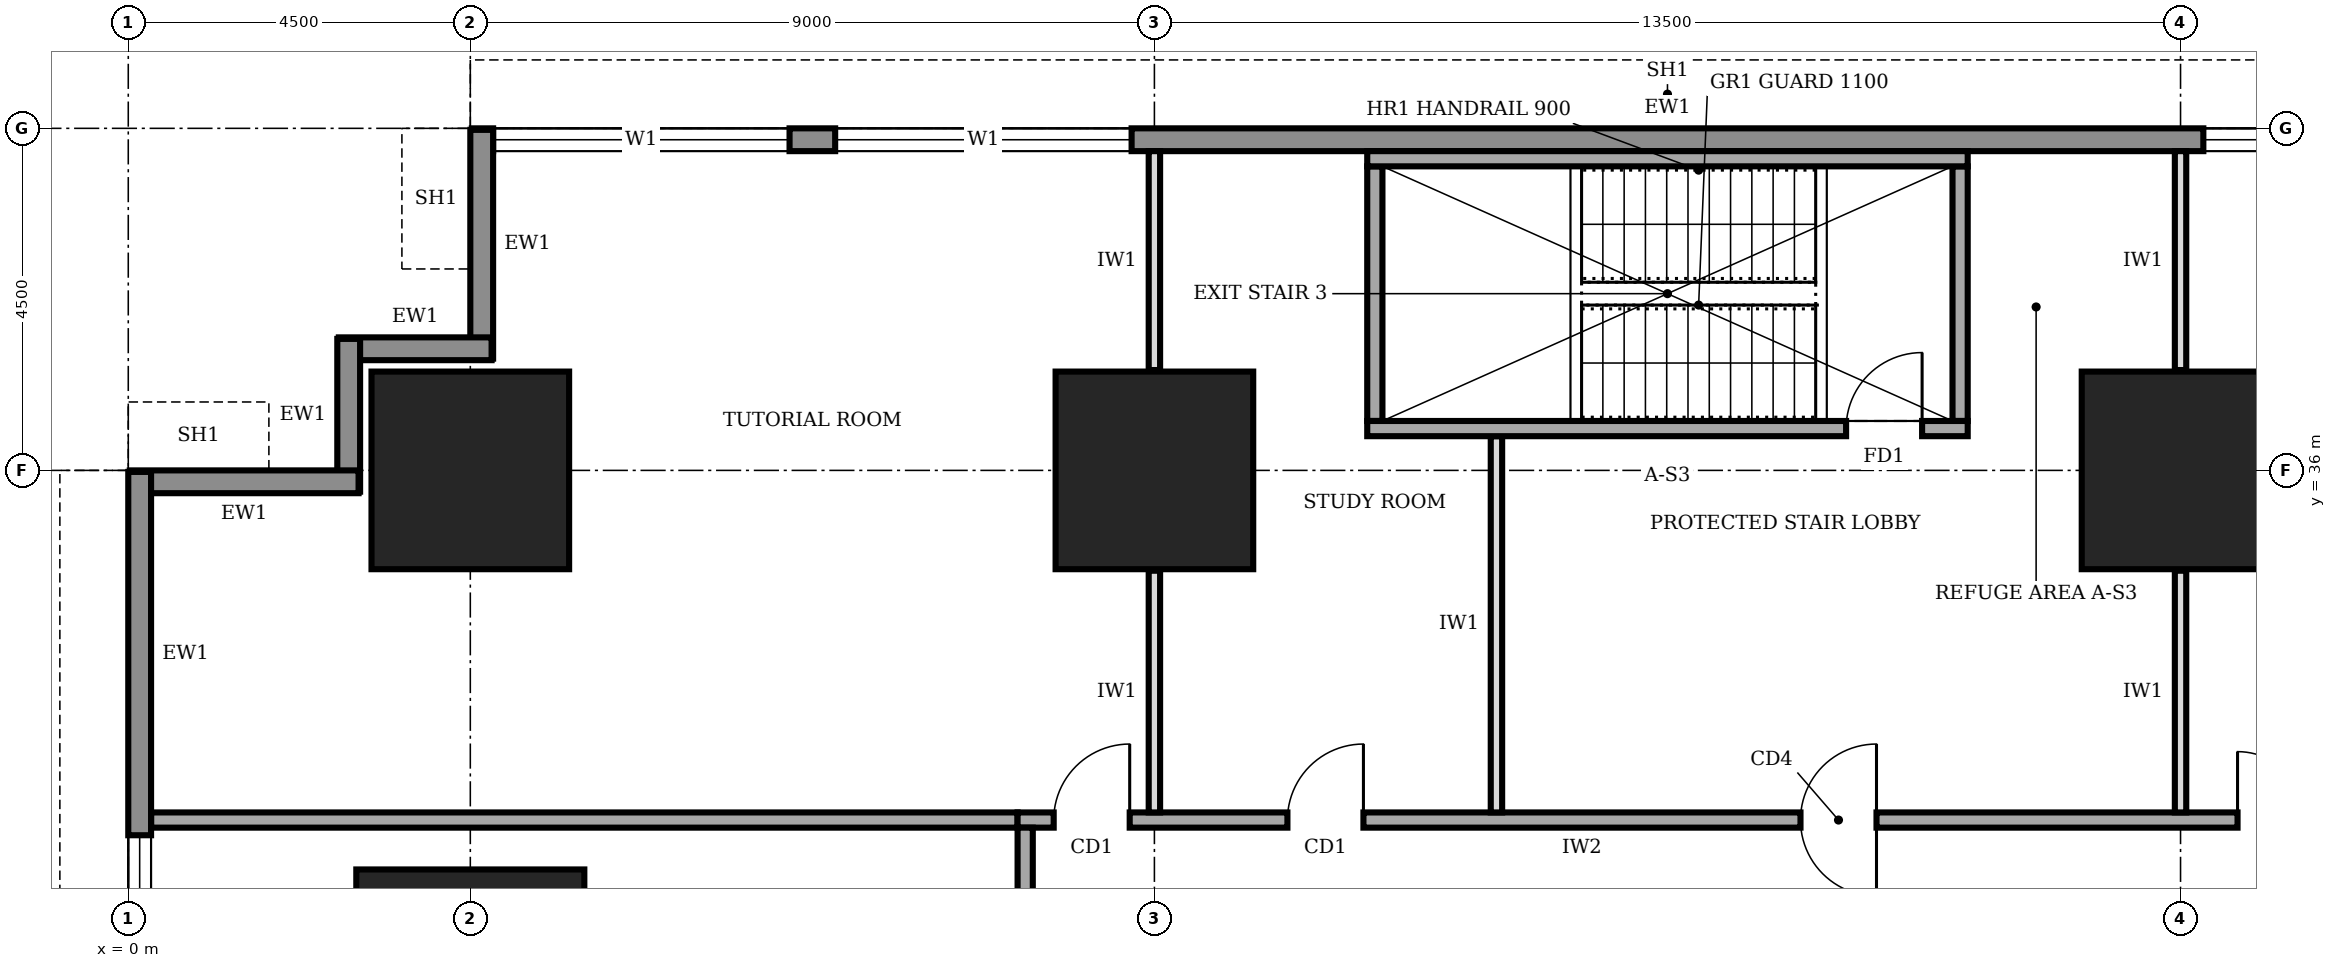
"""IFC4 building model, lengths in metres.
Left out: names, types, materials, properties, quantities, classifications, styles, units other than length and angle.
Written with IfcOpenShell. Run it as: python <this file> out.ifc"""

import sys

from ifc_helpers import new_model, si_unit, direction, frame, frame_2d, origin, origin_2d, place, context, subcontext, project, spatial, rectangle, extrude, element, fill, save


model = new_model("IFC4")
c1 = context("Model", 3, precision=1e-05, world=origin(), true_north=direction((0.0, 1.0)))
c2 = subcontext(c1, "Body", "Model", "MODEL_VIEW")
j1 = project(units=[si_unit("LENGTHUNIT", "METRE"), si_unit("PLANEANGLEUNIT", "RADIAN")], contexts=[c1])
p1 = place(None, origin())
s1 = spatial("IfcSite", under=j1, at=p1, CompositionType="ELEMENT")
p2 = place(p1, origin())
s2 = spatial("IfcBuilding", under=s1, at=p2, CompositionType="ELEMENT")
p3 = place(p2, frame((0.0, 0.0, 37.0)))
s3 = spatial("IfcBuildingStorey", under=s2, at=p3, CompositionType="ELEMENT", Elevation=37.0)
p4 = place(p3, frame((4.5, 29.25, 0.0), z_axis=(0.0, 0.0, 1.0), x_axis=(1.0, 0.0, 0.0)))
e1 = element("IfcColumn", 1, at=p4, inside=s3, PredefinedType="COLUMN", context=c2, shape_type="SweptSolid", body=[
    extrude(rectangle(XDim=3.0, YDim=3.0, at=origin_2d()), origin(), (0.0, 0.0, 1.0), 4.0),
])
for number, where, z_axis, x_axis in (
    (2, (4.5, 36.0, 0.0), (0.0, 0.0, 1.0), (1.0, 0.0, 0.0)),
    (3, (13.5, 36.0, 0.0), (0.0, 0.0, 1.0), (1.0, 0.0, 0.0)),
    (4, (27.0, 36.0, 0.0), (0.0, 0.0, 1.0), (1.0, 0.0, 0.0)),
):
    element("IfcColumn", number, at=place(p3, frame(where, z_axis=z_axis, x_axis=x_axis)), inside=s3, PredefinedType="COLUMN", context=c2, shape_type="SweptSolid", body=[
        extrude(rectangle(XDim=2.6, YDim=2.6, at=origin_2d()), origin(), (0.0, 0.0, 1.0), 4.0),
    ])
p5 = place(p3, frame((35.98, 40.35, 0.0), z_axis=(0.0, 0.0, 1.0), x_axis=(-1.0, 0.0, 0.0)))
e5 = element("IfcWall", 5, at=p5, inside=s3, PredefinedType="STANDARD", context=c2, shape_type="SweptSolid", body=[
    extrude(rectangle(XDim=31.46, YDim=0.3, at=frame_2d((15.73, 0.0))), origin(), (0.0, 0.0, 1.0), 3.75),
])
p6 = place(p5, frame((27.28, 0.0, 0.9)))
e6 = element("IfcOpeningElement", 6, at=p6, cuts=e5, PredefinedType="OPENING", context=c2, shape_type="SweptSolid", body=[
    extrude(rectangle(XDim=3.9, YDim=2.2, at=frame_2d((1.95, 1.1))), frame((0.0, 0.16, 0.0), z_axis=(0.0, -1.0, 0.0), x_axis=(1.0, 0.0, 0.0)), (0.0, 0.0, 1.0), 0.32),
])
p7 = place(p5, frame((22.78, 0.0, 0.9)))
e7 = element("IfcOpeningElement", 7, at=p7, cuts=e5, PredefinedType="OPENING", context=c2, shape_type="SweptSolid", body=[
    extrude(rectangle(XDim=3.9, YDim=2.2, at=frame_2d((1.95, 1.1))), frame((0.0, 0.16, 0.0), z_axis=(0.0, -1.0, 0.0), x_axis=(1.0, 0.0, 0.0)), (0.0, 0.0, 1.0), 0.32),
])
p8 = place(p5, frame((4.78, 0.0, 0.9)))
e8 = element("IfcOpeningElement", 8, at=p8, cuts=e5, PredefinedType="OPENING", context=c2, shape_type="SweptSolid", body=[
    extrude(rectangle(XDim=3.9, YDim=2.2, at=frame_2d((1.95, 1.1))), frame((0.0, 0.16, 0.0), z_axis=(0.0, -1.0, 0.0), x_axis=(1.0, 0.0, 0.0)), (0.0, 0.0, 1.0), 0.32),
])
p9 = place(p3, frame((4.65, 40.48, 0.0), z_axis=(0.0, 0.0, 1.0), x_axis=(0.0, -1.0, 0.0)))
e9 = element("IfcWall", 9, at=p9, inside=s3, PredefinedType="STANDARD", context=c2, shape_type="SweptSolid", body=[
    extrude(rectangle(XDim=3.01, YDim=0.3, at=frame_2d((1.505, 0.0))), origin(), (0.0, 0.0, 1.0), 2.85),
])
for number, where, z_axis, x_axis in (
    (10, (4.78, 37.6, 0.0), (0.0, 0.0, 1.0), (-1.0, 0.0, 0.0)),
    (11, (2.9, 37.73, 0.0), (0.0, 0.0, 1.0), (0.0, -1.0, 0.0)),
):
    element("IfcWall", number, at=place(p3, frame(where, z_axis=z_axis, x_axis=x_axis)), inside=s3, PredefinedType="STANDARD", context=c2, shape_type="SweptSolid", body=[
        extrude(rectangle(XDim=2.01, YDim=0.3, at=frame_2d((1.005, 0.0))), origin(), (0.0, 0.0, 1.0), 3.75),
    ])
p10 = place(p3, frame((3.03, 35.85, 0.0), z_axis=(0.0, 0.0, 1.0), x_axis=(-1.0, 0.0, 0.0)))
e12 = element("IfcWall", 12, at=p10, inside=s3, PredefinedType="STANDARD", context=c2, shape_type="SweptSolid", body=[
    extrude(rectangle(XDim=3.01, YDim=0.3, at=frame_2d((1.505, 0.0))), origin(), (0.0, 0.0, 1.0), 2.85),
])
p11 = place(p3, frame((0.15, 35.98, 0.0), z_axis=(0.0, 0.0, 1.0), x_axis=(0.0, -1.0, 0.0)))
e13 = element("IfcWall", 13, at=p11, inside=s3, PredefinedType="STANDARD", context=c2, shape_type="SweptSolid", body=[
    extrude(rectangle(XDim=31.46, YDim=0.3, at=frame_2d((15.73, 0.0))), origin(), (0.0, 0.0, 1.0), 3.75),
])
p12 = place(p11, frame((27.28, 0.0, 0.9)))
e14 = element("IfcOpeningElement", 14, at=p12, cuts=e13, PredefinedType="OPENING", context=c2, shape_type="SweptSolid", body=[
    extrude(rectangle(XDim=3.9, YDim=2.2, at=frame_2d((1.95, 1.1))), frame((0.0, 0.16, 0.0), z_axis=(0.0, -1.0, 0.0), x_axis=(1.0, 0.0, 0.0)), (0.0, 0.0, 1.0), 0.32),
])
p13 = place(p11, frame((22.78, 0.0, 0.9)))
e15 = element("IfcOpeningElement", 15, at=p13, cuts=e13, PredefinedType="OPENING", context=c2, shape_type="SweptSolid", body=[
    extrude(rectangle(XDim=3.9, YDim=2.2, at=frame_2d((1.95, 1.1))), frame((0.0, 0.16, 0.0), z_axis=(0.0, -1.0, 0.0), x_axis=(1.0, 0.0, 0.0)), (0.0, 0.0, 1.0), 0.32),
])
p14 = place(p11, frame((18.28, 0.0, 0.9)))
e16 = element("IfcOpeningElement", 16, at=p14, cuts=e13, PredefinedType="OPENING", context=c2, shape_type="SweptSolid", body=[
    extrude(rectangle(XDim=3.9, YDim=2.2, at=frame_2d((1.95, 1.1))), frame((0.0, 0.16, 0.0), z_axis=(0.0, -1.0, 0.0), x_axis=(1.0, 0.0, 0.0)), (0.0, 0.0, 1.0), 0.32),
])
p15 = place(p11, frame((13.78, 0.0, 0.9)))
e17 = element("IfcOpeningElement", 17, at=p15, cuts=e13, PredefinedType="OPENING", context=c2, shape_type="SweptSolid", body=[
    extrude(rectangle(XDim=3.9, YDim=2.2, at=frame_2d((1.95, 1.1))), frame((0.0, 0.16, 0.0), z_axis=(0.0, -1.0, 0.0), x_axis=(1.0, 0.0, 0.0)), (0.0, 0.0, 1.0), 0.32),
])
p16 = place(p11, frame((9.28, 0.0, 0.9)))
e18 = element("IfcOpeningElement", 18, at=p16, cuts=e13, PredefinedType="OPENING", context=c2, shape_type="SweptSolid", body=[
    extrude(rectangle(XDim=3.9, YDim=2.2, at=frame_2d((1.95, 1.1))), frame((0.0, 0.16, 0.0), z_axis=(0.0, -1.0, 0.0), x_axis=(1.0, 0.0, 0.0)), (0.0, 0.0, 1.0), 0.32),
])
p17 = place(p11, frame((4.78, 0.0, 0.9)))
e19 = element("IfcOpeningElement", 19, at=p17, cuts=e13, PredefinedType="OPENING", context=c2, shape_type="SweptSolid", body=[
    extrude(rectangle(XDim=3.9, YDim=2.2, at=frame_2d((1.95, 1.1))), frame((0.0, 0.16, 0.0), z_axis=(0.0, -1.0, 0.0), x_axis=(1.0, 0.0, 0.0)), (0.0, 0.0, 1.0), 0.32),
])
p18 = place(p3, frame((30.1, 31.4, 0.0), z_axis=(0.0, 0.0, 1.0), x_axis=(-1.0, 0.0, 0.0)))
e20 = element("IfcWall", 20, at=p18, inside=s3, PredefinedType="SOLIDWALL", context=c2, shape_type="SweptSolid", body=[
    extrude(rectangle(XDim=18.4, YDim=0.2, at=frame_2d((9.2, 0.0))), origin(), (0.0, 0.0, 1.0), 3.75),
])
p19 = place(p18, frame((16.925, 0.0, 0.0)))
e21 = element("IfcOpeningElement", 21, at=p19, cuts=e20, PredefinedType="OPENING", context=c2, shape_type="SweptSolid", body=[
    extrude(rectangle(XDim=1.0, YDim=2.1, at=frame_2d((0.5, 1.05))), frame((0.0, 0.11, 0.0), z_axis=(0.0, -1.0, 0.0), x_axis=(1.0, 0.0, 0.0)), (0.0, 0.0, 1.0), 0.22),
])
p20 = place(p18, frame((13.85, 0.0, 0.0)))
e22 = element("IfcOpeningElement", 22, at=p20, cuts=e20, PredefinedType="OPENING", context=c2, shape_type="SweptSolid", body=[
    extrude(rectangle(XDim=1.0, YDim=2.1, at=frame_2d((0.5, 1.05))), frame((0.0, 0.11, 0.0), z_axis=(0.0, -1.0, 0.0), x_axis=(1.0, 0.0, 0.0)), (0.0, 0.0, 1.0), 0.22),
])
p21 = place(p18, frame((7.1, 0.0, 0.0)))
e23 = element("IfcOpeningElement", 23, at=p21, cuts=e20, PredefinedType="OPENING", context=c2, shape_type="SweptSolid", body=[
    extrude(rectangle(XDim=1.0, YDim=2.1, at=frame_2d((0.5, 1.05))), frame((0.0, 0.11, 0.0), z_axis=(0.0, -1.0, 0.0), x_axis=(1.0, 0.0, 0.0)), (0.0, 0.0, 1.0), 0.22),
])
p22 = place(p18, frame((0.55, 0.0, 0.0)))
e24 = element("IfcOpeningElement", 24, at=p22, cuts=e20, PredefinedType="OPENING", context=c2, shape_type="SweptSolid", body=[
    extrude(rectangle(XDim=1.8, YDim=2.1, at=frame_2d((0.9, 1.05))), frame((0.0, 0.11, 0.0), z_axis=(0.0, -1.0, 0.0), x_axis=(1.0, 0.0, 0.0)), (0.0, 0.0, 1.0), 0.22),
])
p23 = place(p3, frame((11.8, 31.3, 0.0), z_axis=(0.0, 0.0, 1.0), x_axis=(0.0, -1.0, 0.0)))
e25 = element("IfcWall", 25, at=p23, inside=s3, PredefinedType="SOLIDWALL", context=c2, shape_type="SweptSolid", body=[
    extrude(rectangle(XDim=22.3, YDim=0.2, at=frame_2d((11.15, 0.0))), origin(), (0.0, 0.0, 1.0), 3.75),
])
p24 = place(p23, frame((19.55, 0.0, 0.0)))
e26 = element("IfcOpeningElement", 26, at=p24, cuts=e25, PredefinedType="OPENING", context=c2, shape_type="SweptSolid", body=[
    extrude(rectangle(XDim=1.0, YDim=2.1, at=frame_2d((0.5, 1.05))), frame((0.0, 0.11, 0.0), z_axis=(0.0, -1.0, 0.0), x_axis=(1.0, 0.0, 0.0)), (0.0, 0.0, 1.0), 0.22),
])
p25 = place(p23, frame((15.45, 0.0, 0.0)))
e27 = element("IfcOpeningElement", 27, at=p25, cuts=e25, PredefinedType="OPENING", context=c2, shape_type="SweptSolid", body=[
    extrude(rectangle(XDim=0.9, YDim=2.1, at=frame_2d((0.45, 1.05))), frame((0.0, 0.11, 0.0), z_axis=(0.0, -1.0, 0.0), x_axis=(1.0, 0.0, 0.0)), (0.0, 0.0, 1.0), 0.22),
])
p26 = place(p23, frame((12.45, 0.0, 0.0)))
e28 = element("IfcOpeningElement", 28, at=p26, cuts=e25, PredefinedType="OPENING", context=c2, shape_type="SweptSolid", body=[
    extrude(rectangle(XDim=0.9, YDim=2.1, at=frame_2d((0.45, 1.05))), frame((0.0, 0.11, 0.0), z_axis=(0.0, -1.0, 0.0), x_axis=(1.0, 0.0, 0.0)), (0.0, 0.0, 1.0), 0.22),
])
p27 = place(p23, frame((7.6, 0.0, 0.0)))
e29 = element("IfcOpeningElement", 29, at=p27, cuts=e25, PredefinedType="OPENING", context=c2, shape_type="SweptSolid", body=[
    extrude(rectangle(XDim=0.9, YDim=2.1, at=frame_2d((0.45, 1.05))), frame((0.0, 0.11, 0.0), z_axis=(0.0, -1.0, 0.0), x_axis=(1.0, 0.0, 0.0)), (0.0, 0.0, 1.0), 0.22),
])
p28 = place(p23, frame((4.8, 0.0, 0.0)))
e30 = element("IfcOpeningElement", 30, at=p28, cuts=e25, PredefinedType="OPENING", context=c2, shape_type="SweptSolid", body=[
    extrude(rectangle(XDim=1.0, YDim=2.1, at=frame_2d((0.5, 1.05))), frame((0.0, 0.11, 0.0), z_axis=(0.0, -1.0, 0.0), x_axis=(1.0, 0.0, 0.0)), (0.0, 0.0, 1.0), 0.22),
])
p29 = place(p23, frame((10.3, 0.0, 0.0)))
e31 = element("IfcOpeningElement", 31, at=p29, cuts=e25, PredefinedType="OPENING", context=c2, shape_type="SweptSolid", body=[
    extrude(rectangle(XDim=1.0, YDim=2.1, at=frame_2d((0.5, 1.05))), frame((0.0, 0.11, 0.0), z_axis=(0.0, -1.0, 0.0), x_axis=(1.0, 0.0, 0.0)), (0.0, 0.0, 1.0), 0.22),
])
p30 = place(p23, frame((1.55, 0.0, 0.0)))
e32 = element("IfcOpeningElement", 32, at=p30, cuts=e25, PredefinedType="OPENING", context=c2, shape_type="SweptSolid", body=[
    extrude(rectangle(XDim=1.0, YDim=2.1, at=frame_2d((0.5, 1.05))), frame((0.0, 0.11, 0.0), z_axis=(0.0, -1.0, 0.0), x_axis=(1.0, 0.0, 0.0)), (0.0, 0.0, 1.0), 0.22),
])
p31 = place(p3, frame((0.3, 31.4, 0.0), z_axis=(0.0, 0.0, 1.0), x_axis=(1.0, 0.0, 0.0)))
e33 = element("IfcWall", 33, at=p31, inside=s3, PredefinedType="SOLIDWALL", context=c2, shape_type="SweptSolid", body=[
    extrude(rectangle(XDim=11.4, YDim=0.2, at=frame_2d((5.7, 0.0))), origin(), (0.0, 0.0, 1.0), 3.75),
])
p32 = place(p3, frame((13.5, 31.5, 0.0), z_axis=(0.0, 0.0, 1.0), x_axis=(0.0, 1.0, 0.0)))
e34 = element("IfcWall", 34, at=p32, inside=s3, PredefinedType="PARTITIONING", context=c2, shape_type="SweptSolid", body=[
    extrude(rectangle(XDim=3.18, YDim=0.15, at=frame_2d((1.59, 0.0))), origin(), (0.0, 0.0, 1.0), 2.85),
])
p33 = place(p3, frame((13.5, 37.32, 0.0), z_axis=(0.0, 0.0, 1.0), x_axis=(0.0, 1.0, 0.0)))
e35 = element("IfcWall", 35, at=p33, inside=s3, PredefinedType="PARTITIONING", context=c2, shape_type="SweptSolid", body=[
    extrude(rectangle(XDim=2.88, YDim=0.15, at=frame_2d((1.44, 0.0))), origin(), (0.0, 0.0, 1.0), 2.85),
])
p34 = place(p3, frame((18.0, 31.5, 0.0), z_axis=(0.0, 0.0, 1.0), x_axis=(0.0, 1.0, 0.0)))
e36 = element("IfcWall", 36, at=p34, inside=s3, PredefinedType="PARTITIONING", context=c2, shape_type="SweptSolid", body=[
    extrude(rectangle(XDim=4.95, YDim=0.15, at=frame_2d((2.475, 0.0))), origin(), (0.0, 0.0, 1.0), 3.75),
])
p35 = place(p3, frame((27.0, 31.5, 0.0), z_axis=(0.0, 0.0, 1.0), x_axis=(0.0, 1.0, 0.0)))
e37 = element("IfcWall", 37, at=p35, inside=s3, PredefinedType="PARTITIONING", context=c2, shape_type="SweptSolid", body=[
    extrude(rectangle(XDim=3.18, YDim=0.15, at=frame_2d((1.59, 0.0))), origin(), (0.0, 0.0, 1.0), 2.85),
])
p36 = place(p3, frame((27.0, 37.32, 0.0), z_axis=(0.0, 0.0, 1.0), x_axis=(0.0, 1.0, 0.0)))
e38 = element("IfcWall", 38, at=p36, inside=s3, PredefinedType="PARTITIONING", context=c2, shape_type="SweptSolid", body=[
    extrude(rectangle(XDim=2.88, YDim=0.15, at=frame_2d((1.44, 0.0))), origin(), (0.0, 0.0, 1.0), 2.85),
])
p37 = place(p3, frame((16.3, 36.55, 0.0), z_axis=(0.0, 0.0, 1.0), x_axis=(1.0, 0.0, 0.0)))
e39 = element("IfcWall", 39, at=p37, inside=s3, PredefinedType="SOLIDWALL", context=c2, shape_type="SweptSolid", body=[
    extrude(rectangle(XDim=7.9, YDim=0.2, at=frame_2d((3.95, 0.0))), origin(), (0.0, 0.0, 1.0), 3.75),
])
p38 = place(p37, frame((6.3, 0.0, 0.0)))
e40 = element("IfcOpeningElement", 40, at=p38, cuts=e39, PredefinedType="OPENING", context=c2, shape_type="SweptSolid", body=[
    extrude(rectangle(XDim=1.0, YDim=2.1, at=frame_2d((0.5, 1.05))), frame((0.0, 0.11, 0.0), z_axis=(0.0, -1.0, 0.0), x_axis=(1.0, 0.0, 0.0)), (0.0, 0.0, 1.0), 0.22),
])
p39 = place(p3, frame((16.3, 40.1, 0.0), z_axis=(0.0, 0.0, 1.0), x_axis=(1.0, 0.0, 0.0)))
e41 = element("IfcWall", 41, at=p39, inside=s3, PredefinedType="SOLIDWALL", context=c2, shape_type="SweptSolid", body=[
    extrude(rectangle(XDim=7.9, YDim=0.2, at=frame_2d((3.95, 0.0))), origin(), (0.0, 0.0, 1.0), 3.75),
])
for number, where, z_axis, x_axis in (
    (42, (16.4, 36.65, 0.0), (0.0, 0.0, 1.0), (0.0, 1.0, 0.0)),
    (43, (24.1, 36.65, 0.0), (0.0, 0.0, 1.0), (0.0, 1.0, 0.0)),
):
    element("IfcWall", number, at=place(p3, frame(where, z_axis=z_axis, x_axis=x_axis)), inside=s3, PredefinedType="SOLIDWALL", context=c2, shape_type="SweptSolid", body=[
        extrude(rectangle(XDim=3.35, YDim=0.2, at=frame_2d((1.675, 0.0))), origin(), (0.0, 0.0, 1.0), 3.75),
    ])
p40 = place(p6, origin())
e44 = element("IfcWindow", 44, at=p40, inside=s3, PartitioningType="SINGLE_PANEL", PredefinedType="WINDOW", context=c2, shape_type="SweptSolid", body=[
    extrude(rectangle(XDim=3.9, YDim=2.2, at=frame_2d((1.95, 1.1))), frame((0.0, 0.03, 0.0), z_axis=(0.0, -1.0, 0.0), x_axis=(1.0, 0.0, 0.0)), (0.0, 0.0, 1.0), 0.06),
])
fill(e6, e44)
p41 = place(p7, origin())
e45 = element("IfcWindow", 45, at=p41, inside=s3, PartitioningType="SINGLE_PANEL", PredefinedType="WINDOW", context=c2, shape_type="SweptSolid", body=[
    extrude(rectangle(XDim=3.9, YDim=2.2, at=frame_2d((1.95, 1.1))), frame((0.0, 0.03, 0.0), z_axis=(0.0, -1.0, 0.0), x_axis=(1.0, 0.0, 0.0)), (0.0, 0.0, 1.0), 0.06),
])
fill(e7, e45)
p42 = place(p8, origin())
e46 = element("IfcWindow", 46, at=p42, inside=s3, PartitioningType="SINGLE_PANEL", PredefinedType="WINDOW", context=c2, shape_type="SweptSolid", body=[
    extrude(rectangle(XDim=3.9, YDim=2.2, at=frame_2d((1.95, 1.1))), frame((0.0, 0.03, 0.0), z_axis=(0.0, -1.0, 0.0), x_axis=(1.0, 0.0, 0.0)), (0.0, 0.0, 1.0), 0.06),
])
fill(e8, e46)
p43 = place(p17, origin())
e47 = element("IfcWindow", 47, at=p43, inside=s3, PartitioningType="SINGLE_PANEL", PredefinedType="WINDOW", context=c2, shape_type="SweptSolid", body=[
    extrude(rectangle(XDim=3.9, YDim=2.2, at=frame_2d((1.95, 1.1))), frame((0.0, 0.03, 0.0), z_axis=(0.0, -1.0, 0.0), x_axis=(1.0, 0.0, 0.0)), (0.0, 0.0, 1.0), 0.06),
])
fill(e19, e47)
p44 = place(p19, frame((1.0, 0.0, 0.0), z_axis=(0.0, 0.0, 1.0), x_axis=(-1.0, 0.0, 0.0)))
e48 = element("IfcDoor", 48, at=p44, inside=s3, OperationType="SINGLE_SWING_RIGHT", PredefinedType="DOOR", context=c2, shape_type="SweptSolid", body=[
    extrude(rectangle(XDim=1.0, YDim=2.1, at=frame_2d((0.5, 1.05))), frame((0.0, 0.025, 0.0), z_axis=(0.0, -1.0, 0.0), x_axis=(1.0, 0.0, 0.0)), (0.0, 0.0, 1.0), 0.05),
])
fill(e21, e48)
p45 = place(p20, frame((1.0, 0.0, 0.0), z_axis=(0.0, 0.0, 1.0), x_axis=(-1.0, 0.0, 0.0)))
e49 = element("IfcDoor", 49, at=p45, inside=s3, OperationType="SINGLE_SWING_RIGHT", PredefinedType="DOOR", context=c2, shape_type="SweptSolid", body=[
    extrude(rectangle(XDim=1.0, YDim=2.1, at=frame_2d((0.5, 1.05))), frame((0.0, 0.025, 0.0), z_axis=(0.0, -1.0, 0.0), x_axis=(1.0, 0.0, 0.0)), (0.0, 0.0, 1.0), 0.05),
])
fill(e22, e49)
p46 = place(p21, origin())
e50 = element("IfcDoor", 50, at=p46, inside=s3, OperationType="DOUBLE_SWING_LEFT", PredefinedType="DOOR", context=c2, shape_type="SweptSolid", body=[
    extrude(rectangle(XDim=1.0, YDim=2.1, at=frame_2d((0.5, 1.05))), frame((0.0, 0.025, 0.0), z_axis=(0.0, -1.0, 0.0), x_axis=(1.0, 0.0, 0.0)), (0.0, 0.0, 1.0), 0.05),
])
fill(e23, e50)
p47 = place(p22, frame((1.8, 0.0, 0.0), z_axis=(0.0, 0.0, 1.0), x_axis=(-1.0, 0.0, 0.0)))
e51 = element("IfcDoor", 51, at=p47, inside=s3, OperationType="DOUBLE_DOOR_SINGLE_SWING", PredefinedType="DOOR", context=c2, shape_type="SweptSolid", body=[
    extrude(rectangle(XDim=1.8, YDim=2.1, at=frame_2d((0.9, 1.05))), frame((0.0, 0.025, 0.0), z_axis=(0.0, -1.0, 0.0), x_axis=(1.0, 0.0, 0.0)), (0.0, 0.0, 1.0), 0.05),
])
fill(e24, e51)
p48 = place(p38, origin())
e52 = element("IfcDoor", 52, at=p48, inside=s3, OperationType="SINGLE_SWING_RIGHT", PredefinedType="DOOR", context=c2, shape_type="SweptSolid", body=[
    extrude(rectangle(XDim=1.0, YDim=2.1, at=frame_2d((0.5, 1.05))), frame((0.0, 0.025, 0.0), z_axis=(0.0, -1.0, 0.0), x_axis=(1.0, 0.0, 0.0)), (0.0, 0.0, 1.0), 0.05),
])
fill(e40, e52)
save(model, sys.argv[1])
